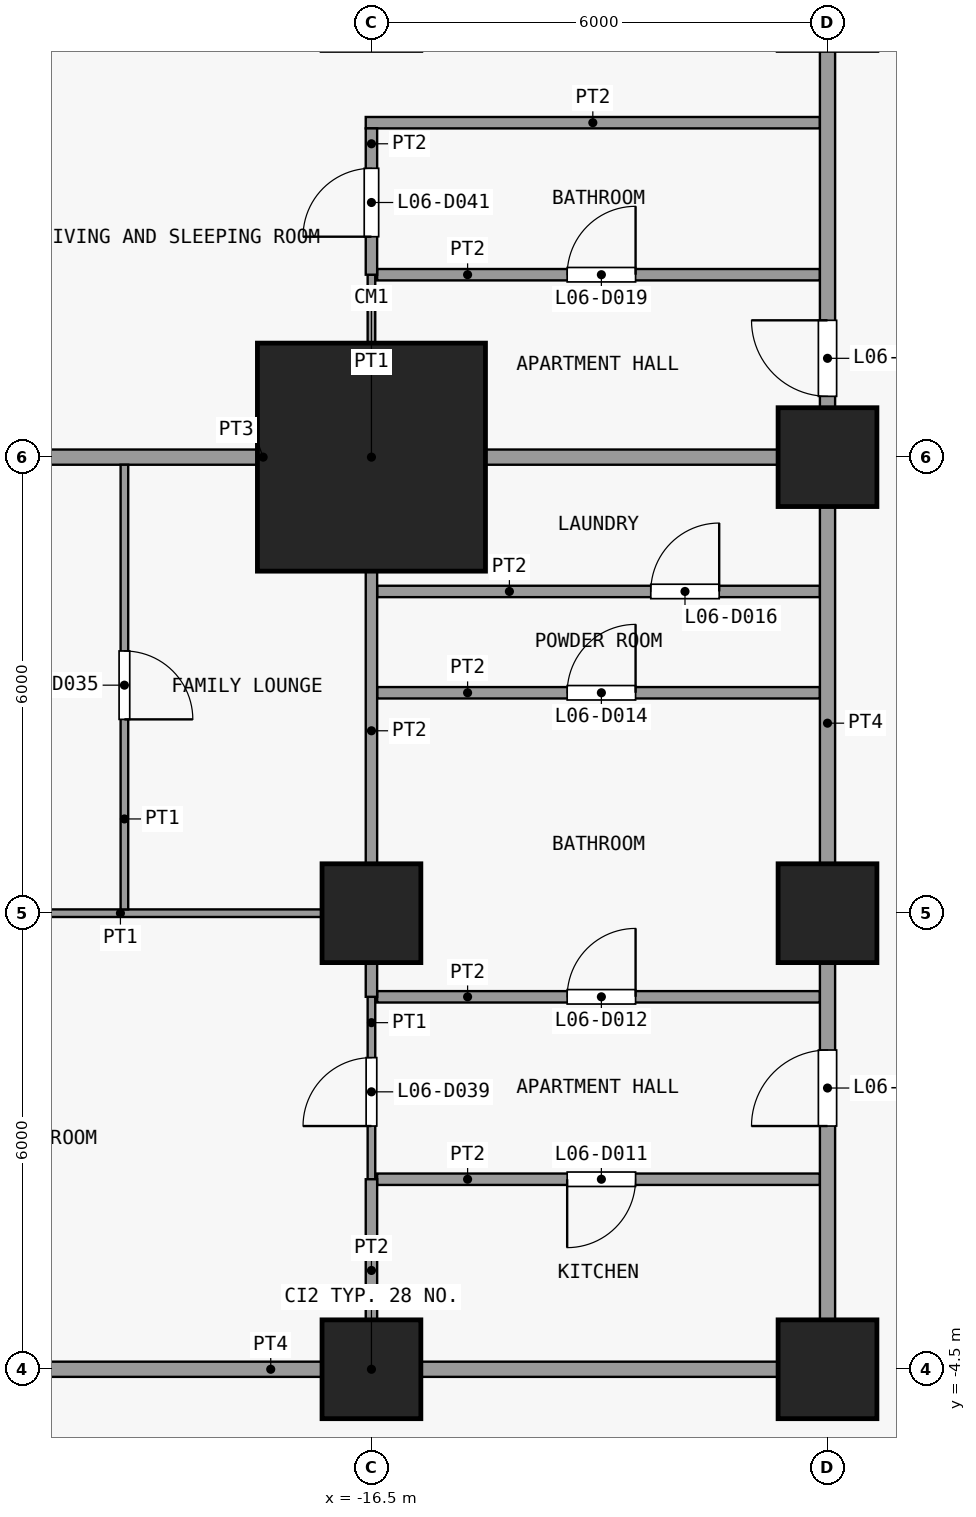
"""IFC4 building model, lengths in metres.
Left out: names, types, materials, properties, quantities, classifications, styles, units other than length and angle.
Written with IfcOpenShell. Run it as: python <this file> out.ifc"""

import sys

from ifc_helpers import new_model, si_unit, direction, frame, frame_2d, origin, origin_2d, place, context, subcontext, project, spatial, rectangle, extrude, element, fill, save


model = new_model("IFC4")
c1 = context("Model", 3, precision=1e-05, world=origin(), true_north=direction((0.0, 1.0)))
c2 = subcontext(c1, "Body", "Model", "MODEL_VIEW")
j1 = project(units=[si_unit("LENGTHUNIT", "METRE"), si_unit("PLANEANGLEUNIT", "RADIAN")], contexts=[c1])
p1 = place(None, origin())
s1 = spatial("IfcSite", under=j1, at=p1, CompositionType="ELEMENT")
p2 = place(p1, origin())
s2 = spatial("IfcBuilding", under=s1, at=p2, CompositionType="ELEMENT")
p3 = place(p2, frame((0.0, 0.0, 32.5)))
s3 = spatial("IfcBuildingStorey", under=s2, at=p3, CompositionType="ELEMENT", Elevation=32.5)
for number, where, z_axis, x_axis in (
    (1, (-16.5, -4.5, 0.0), (0.0, 0.0, 1.0), (1.0, 0.0, 0.0)),
    (2, (-16.5, 1.5, 0.0), (0.0, 0.0, 1.0), (1.0, 0.0, 0.0)),
):
    element("IfcColumn", number, at=place(p3, frame(where, z_axis=z_axis, x_axis=x_axis)), inside=s3, PredefinedType="COLUMN", context=c2, shape_type="SweptSolid", body=[
        extrude(rectangle(XDim=1.3, YDim=1.3, at=origin_2d()), origin(), (0.0, 0.0, 1.0), 3.6),
    ])
p4 = place(p3, frame((-16.5, 7.5, 0.0), z_axis=(0.0, 0.0, 1.0), x_axis=(1.0, 0.0, 0.0)))
e3 = element("IfcColumn", 3, at=p4, inside=s3, PredefinedType="COLUMN", context=c2, shape_type="SweptSolid", body=[
    extrude(rectangle(XDim=3.0, YDim=3.0, at=origin_2d()), origin(), (0.0, 0.0, 1.0), 3.6),
])
for number, where, z_axis, x_axis in (
    (4, (-10.5, -4.5, 0.0), (0.0, 0.0, 1.0), (1.0, 0.0, 0.0)),
    (5, (-10.5, 1.5, 0.0), (0.0, 0.0, 1.0), (1.0, 0.0, 0.0)),
    (6, (-10.5, 7.5, 0.0), (0.0, 0.0, 1.0), (1.0, 0.0, 0.0)),
):
    element("IfcColumn", number, at=place(p3, frame(where, z_axis=z_axis, x_axis=x_axis)), inside=s3, PredefinedType="COLUMN", context=c2, shape_type="SweptSolid", body=[
        extrude(rectangle(XDim=1.3, YDim=1.3, at=origin_2d()), origin(), (0.0, 0.0, 1.0), 3.6),
    ])
p5 = place(p3, frame((-25.25, -4.5, 0.0), z_axis=(0.0, 0.0, 1.0), x_axis=(1.0, 0.0, 0.0)))
e7 = element("IfcWall", 7, at=p5, inside=s3, PredefinedType="PARTITIONING", context=c2, shape_type="SweptSolid", body=[
    extrude(rectangle(XDim=14.85, YDim=0.2, at=frame_2d((7.425, 0.0))), origin(), (0.0, 0.0, 1.0), 3.3),
])
p6 = place(p3, frame((-16.425, -2.0, 0.0), z_axis=(0.0, 0.0, 1.0), x_axis=(1.0, 0.0, 0.0)))
e8 = element("IfcWall", 8, at=p6, inside=s3, PredefinedType="PARTITIONING", context=c2, shape_type="SweptSolid", body=[
    extrude(rectangle(XDim=5.825, YDim=0.15, at=frame_2d((2.913, 0.0))), origin(), (0.0, 0.0, 1.0), 3.3),
])
p7 = place(p6, frame((2.5, 0.0, 0.0)))
e9 = element("IfcOpeningElement", 9, at=p7, cuts=e8, PredefinedType="OPENING", context=c2, shape_type="SweptSolid", body=[
    extrude(rectangle(XDim=0.9, YDim=2.1, at=frame_2d((0.45, 1.05))), frame((0.0, 0.085, 0.0), z_axis=(0.0, -1.0, 0.0), x_axis=(1.0, 0.0, 0.0)), (0.0, 0.0, 1.0), 0.17),
])
p8 = place(p3, frame((-16.425, 0.4, 0.0), z_axis=(0.0, 0.0, 1.0), x_axis=(1.0, 0.0, 0.0)))
e10 = element("IfcWall", 10, at=p8, inside=s3, PredefinedType="PARTITIONING", context=c2, shape_type="SweptSolid", body=[
    extrude(rectangle(XDim=5.825, YDim=0.15, at=frame_2d((2.913, 0.0))), origin(), (0.0, 0.0, 1.0), 3.3),
])
p9 = place(p8, frame((2.5, 0.0, 0.0)))
e11 = element("IfcOpeningElement", 11, at=p9, cuts=e10, PredefinedType="OPENING", context=c2, shape_type="SweptSolid", body=[
    extrude(rectangle(XDim=0.9, YDim=2.1, at=frame_2d((0.45, 1.05))), frame((0.0, 0.085, 0.0), z_axis=(0.0, -1.0, 0.0), x_axis=(1.0, 0.0, 0.0)), (0.0, 0.0, 1.0), 0.17),
])
p10 = place(p3, frame((-25.25, 1.5, 0.0), z_axis=(0.0, 0.0, 1.0), x_axis=(1.0, 0.0, 0.0)))
e12 = element("IfcWall", 12, at=p10, inside=s3, PredefinedType="PARTITIONING", context=c2, shape_type="SweptSolid", body=[
    extrude(rectangle(XDim=8.675, YDim=0.1, at=frame_2d((4.337, 0.0))), origin(), (0.0, 0.0, 1.0), 3.3),
])
p11 = place(p10, frame((1.2, 0.0, 0.0)))
e13 = element("IfcOpeningElement", 13, at=p11, cuts=e12, PredefinedType="OPENING", context=c2, shape_type="SweptSolid", body=[
    extrude(rectangle(XDim=0.9, YDim=2.1, at=frame_2d((0.45, 1.05))), frame((0.0, 0.06, 0.0), z_axis=(0.0, -1.0, 0.0), x_axis=(1.0, 0.0, 0.0)), (0.0, 0.0, 1.0), 0.12),
])
p12 = place(p3, frame((-16.425, 4.4, 0.0), z_axis=(0.0, 0.0, 1.0), x_axis=(1.0, 0.0, 0.0)))
e14 = element("IfcWall", 14, at=p12, inside=s3, PredefinedType="PARTITIONING", context=c2, shape_type="SweptSolid", body=[
    extrude(rectangle(XDim=5.825, YDim=0.15, at=frame_2d((2.913, 0.0))), origin(), (0.0, 0.0, 1.0), 3.3),
])
p13 = place(p12, frame((2.5, 0.0, 0.0)))
e15 = element("IfcOpeningElement", 15, at=p13, cuts=e14, PredefinedType="OPENING", context=c2, shape_type="SweptSolid", body=[
    extrude(rectangle(XDim=0.9, YDim=2.1, at=frame_2d((0.45, 1.05))), frame((0.0, 0.085, 0.0), z_axis=(0.0, -1.0, 0.0), x_axis=(1.0, 0.0, 0.0)), (0.0, 0.0, 1.0), 0.17),
])
p14 = place(p3, frame((-16.425, 5.733, 0.0), z_axis=(0.0, 0.0, 1.0), x_axis=(1.0, 0.0, 0.0)))
e16 = element("IfcWall", 16, at=p14, inside=s3, PredefinedType="PARTITIONING", context=c2, shape_type="SweptSolid", body=[
    extrude(rectangle(XDim=5.825, YDim=0.15, at=frame_2d((2.913, 0.0))), origin(), (0.0, 0.0, 1.0), 3.3),
])
p15 = place(p14, frame((3.6, 0.0, 0.0)))
e17 = element("IfcOpeningElement", 17, at=p15, cuts=e16, PredefinedType="OPENING", context=c2, shape_type="SweptSolid", body=[
    extrude(rectangle(XDim=0.9, YDim=2.1, at=frame_2d((0.45, 1.05))), frame((0.0, 0.085, 0.0), z_axis=(0.0, -1.0, 0.0), x_axis=(1.0, 0.0, 0.0)), (0.0, 0.0, 1.0), 0.17),
])
p16 = place(p3, frame((-25.25, 7.5, 0.0), z_axis=(0.0, 0.0, 1.0), x_axis=(1.0, 0.0, 0.0)))
e18 = element("IfcWall", 18, at=p16, inside=s3, PredefinedType="PARTITIONING", context=c2, shape_type="SweptSolid", body=[
    extrude(rectangle(XDim=14.65, YDim=0.2, at=frame_2d((7.325, 0.0))), origin(), (0.0, 0.0, 1.0), 3.3),
])
p17 = place(p3, frame((-16.425, 9.9, 0.0), z_axis=(0.0, 0.0, 1.0), x_axis=(1.0, 0.0, 0.0)))
e19 = element("IfcWall", 19, at=p17, inside=s3, PredefinedType="PARTITIONING", context=c2, shape_type="SweptSolid", body=[
    extrude(rectangle(XDim=5.825, YDim=0.15, at=frame_2d((2.913, 0.0))), origin(), (0.0, 0.0, 1.0), 3.3),
])
p18 = place(p17, frame((2.5, 0.0, 0.0)))
e20 = element("IfcOpeningElement", 20, at=p18, cuts=e19, PredefinedType="OPENING", context=c2, shape_type="SweptSolid", body=[
    extrude(rectangle(XDim=0.9, YDim=2.1, at=frame_2d((0.45, 1.05))), frame((0.0, 0.085, 0.0), z_axis=(0.0, -1.0, 0.0), x_axis=(1.0, 0.0, 0.0)), (0.0, 0.0, 1.0), 0.17),
])
p19 = place(p3, frame((-16.575, 11.9, 0.0), z_axis=(0.0, 0.0, 1.0), x_axis=(1.0, 0.0, 0.0)))
e21 = element("IfcWall", 21, at=p19, inside=s3, PredefinedType="PARTITIONING", context=c2, shape_type="SweptSolid", body=[
    extrude(rectangle(XDim=5.975, YDim=0.15, at=frame_2d((2.987, 0.0))), origin(), (0.0, 0.0, 1.0), 3.3),
])
p20 = place(p3, frame((-19.75, 1.55, 0.0), z_axis=(0.0, 0.0, 1.0), x_axis=(0.0, 1.0, 0.0)))
e22 = element("IfcWall", 22, at=p20, inside=s3, PredefinedType="PARTITIONING", context=c2, shape_type="SweptSolid", body=[
    extrude(rectangle(XDim=5.85, YDim=0.1, at=frame_2d((2.925, 0.0))), origin(), (0.0, 0.0, 1.0), 3.3),
])
p21 = place(p20, frame((2.5, 0.0, 0.0)))
e23 = element("IfcOpeningElement", 23, at=p21, cuts=e22, PredefinedType="OPENING", context=c2, shape_type="SweptSolid", body=[
    extrude(rectangle(XDim=0.9, YDim=2.1, at=frame_2d((0.45, 1.05))), frame((0.0, 0.06, 0.0), z_axis=(0.0, -1.0, 0.0), x_axis=(1.0, 0.0, 0.0)), (0.0, 0.0, 1.0), 0.12),
])
p22 = place(p3, frame((-16.5, -2.0, 0.0), z_axis=(0.0, 0.0, 1.0), x_axis=(0.0, 1.0, 0.0)))
e24 = element("IfcWall", 24, at=p22, inside=s3, PredefinedType="PARTITIONING", context=c2, shape_type="SweptSolid", body=[
    extrude(rectangle(XDim=2.4, YDim=0.1, at=frame_2d((1.2, 0.0))), origin(), (0.0, 0.0, 1.0), 3.3),
])
p23 = place(p22, frame((0.7, 0.0, 0.0)))
e25 = element("IfcOpeningElement", 25, at=p23, cuts=e24, PredefinedType="OPENING", context=c2, shape_type="SweptSolid", body=[
    extrude(rectangle(XDim=0.9, YDim=2.1, at=frame_2d((0.45, 1.05))), frame((0.0, 0.06, 0.0), z_axis=(0.0, -1.0, 0.0), x_axis=(1.0, 0.0, 0.0)), (0.0, 0.0, 1.0), 0.12),
])
p24 = place(p3, frame((-16.5, 7.6, 0.0), z_axis=(0.0, 0.0, 1.0), x_axis=(0.0, 1.0, 0.0)))
e26 = element("IfcWall", 26, at=p24, inside=s3, PredefinedType="PARTITIONING", context=c2, shape_type="SweptSolid", body=[
    extrude(rectangle(XDim=2.3, YDim=0.1, at=frame_2d((1.15, 0.0))), origin(), (0.0, 0.0, 1.0), 3.3),
])
p25 = place(p3, frame((-16.5, -4.4, 0.0), z_axis=(0.0, 0.0, 1.0), x_axis=(0.0, 1.0, 0.0)))
e27 = element("IfcWall", 27, at=p25, inside=s3, PredefinedType="PARTITIONING", context=c2, shape_type="SweptSolid", body=[
    extrude(rectangle(XDim=2.4, YDim=0.15, at=frame_2d((1.2, 0.0))), origin(), (0.0, 0.0, 1.0), 3.3),
])
p26 = place(p3, frame((-16.5, 0.4, 0.0), z_axis=(0.0, 0.0, 1.0), x_axis=(0.0, 1.0, 0.0)))
e28 = element("IfcWall", 28, at=p26, inside=s3, PredefinedType="PARTITIONING", context=c2, shape_type="SweptSolid", body=[
    extrude(rectangle(XDim=7.0, YDim=0.15, at=frame_2d((3.5, 0.0))), origin(), (0.0, 0.0, 1.0), 3.3),
])
p27 = place(p3, frame((-16.5, 9.9, 0.0), z_axis=(0.0, 0.0, 1.0), x_axis=(0.0, 1.0, 0.0)))
e29 = element("IfcWall", 29, at=p27, inside=s3, PredefinedType="PARTITIONING", context=c2, shape_type="SweptSolid", body=[
    extrude(rectangle(XDim=1.925, YDim=0.15, at=frame_2d((0.962, 0.0))), origin(), (0.0, 0.0, 1.0), 3.3),
])
p28 = place(p27, frame((0.5, 0.0, 0.0)))
e30 = element("IfcOpeningElement", 30, at=p28, cuts=e29, PredefinedType="OPENING", context=c2, shape_type="SweptSolid", body=[
    extrude(rectangle(XDim=0.9, YDim=2.1, at=frame_2d((0.45, 1.05))), frame((0.0, 0.085, 0.0), z_axis=(0.0, -1.0, 0.0), x_axis=(1.0, 0.0, 0.0)), (0.0, 0.0, 1.0), 0.17),
])
p29 = place(p3, frame((-10.5, -4.4, 0.0), z_axis=(0.0, 0.0, 1.0), x_axis=(0.0, 1.0, 0.0)))
e31 = element("IfcWall", 31, at=p29, inside=s3, PredefinedType="PARTITIONING", context=c2, shape_type="SweptSolid", body=[
    extrude(rectangle(XDim=17.8, YDim=0.2, at=frame_2d((8.9, 0.0))), origin(), (0.0, 0.0, 1.0), 3.3),
])
p30 = place(p29, frame((3.1, 0.0, 0.0)))
e32 = element("IfcOpeningElement", 32, at=p30, cuts=e31, PredefinedType="OPENING", context=c2, shape_type="SweptSolid", body=[
    extrude(rectangle(XDim=1.0, YDim=2.1, at=frame_2d((0.5, 1.05))), frame((0.0, 0.11, 0.0), z_axis=(0.0, -1.0, 0.0), x_axis=(1.0, 0.0, 0.0)), (0.0, 0.0, 1.0), 0.22),
])
p31 = place(p29, frame((12.7, 0.0, 0.0)))
e33 = element("IfcOpeningElement", 33, at=p31, cuts=e31, PredefinedType="OPENING", context=c2, shape_type="SweptSolid", body=[
    extrude(rectangle(XDim=1.0, YDim=2.1, at=frame_2d((0.5, 1.05))), frame((0.0, 0.11, 0.0), z_axis=(0.0, -1.0, 0.0), x_axis=(1.0, 0.0, 0.0)), (0.0, 0.0, 1.0), 0.22),
])
p32 = place(p7, origin())
e34 = element("IfcDoor", 34, at=p32, inside=s3, OperationType="SINGLE_SWING_LEFT", PredefinedType="DOOR", context=c2, shape_type="SweptSolid", body=[
    extrude(rectangle(XDim=0.9, YDim=2.1, at=frame_2d((0.45, 1.05))), frame((0.0, 0.025, 0.0), z_axis=(0.0, -1.0, 0.0), x_axis=(1.0, 0.0, 0.0)), (0.0, 0.0, 1.0), 0.05),
])
fill(e9, e34)
p33 = place(p9, origin())
e35 = element("IfcDoor", 35, at=p33, inside=s3, OperationType="SINGLE_SWING_LEFT", PredefinedType="DOOR", context=c2, shape_type="SweptSolid", body=[
    extrude(rectangle(XDim=0.9, YDim=2.1, at=frame_2d((0.45, 1.05))), frame((0.0, 0.025, 0.0), z_axis=(0.0, -1.0, 0.0), x_axis=(1.0, 0.0, 0.0)), (0.0, 0.0, 1.0), 0.05),
])
fill(e11, e35)
p34 = place(p13, origin())
e36 = element("IfcDoor", 36, at=p34, inside=s3, OperationType="SINGLE_SWING_LEFT", PredefinedType="DOOR", context=c2, shape_type="SweptSolid", body=[
    extrude(rectangle(XDim=0.9, YDim=2.1, at=frame_2d((0.45, 1.05))), frame((0.0, 0.025, 0.0), z_axis=(0.0, -1.0, 0.0), x_axis=(1.0, 0.0, 0.0)), (0.0, 0.0, 1.0), 0.05),
])
fill(e15, e36)
p35 = place(p15, origin())
e37 = element("IfcDoor", 37, at=p35, inside=s3, OperationType="SINGLE_SWING_LEFT", PredefinedType="DOOR", context=c2, shape_type="SweptSolid", body=[
    extrude(rectangle(XDim=0.9, YDim=2.1, at=frame_2d((0.45, 1.05))), frame((0.0, 0.025, 0.0), z_axis=(0.0, -1.0, 0.0), x_axis=(1.0, 0.0, 0.0)), (0.0, 0.0, 1.0), 0.05),
])
fill(e17, e37)
p36 = place(p18, origin())
e38 = element("IfcDoor", 38, at=p36, inside=s3, OperationType="SINGLE_SWING_LEFT", PredefinedType="DOOR", context=c2, shape_type="SweptSolid", body=[
    extrude(rectangle(XDim=0.9, YDim=2.1, at=frame_2d((0.45, 1.05))), frame((0.0, 0.025, 0.0), z_axis=(0.0, -1.0, 0.0), x_axis=(1.0, 0.0, 0.0)), (0.0, 0.0, 1.0), 0.05),
])
fill(e20, e38)
p37 = place(p21, origin())
e39 = element("IfcDoor", 39, at=p37, inside=s3, OperationType="SINGLE_SWING_LEFT", PredefinedType="DOOR", context=c2, shape_type="SweptSolid", body=[
    extrude(rectangle(XDim=0.9, YDim=2.1, at=frame_2d((0.45, 1.05))), frame((0.0, 0.025, 0.0), z_axis=(0.0, -1.0, 0.0), x_axis=(1.0, 0.0, 0.0)), (0.0, 0.0, 1.0), 0.05),
])
fill(e23, e39)
p38 = place(p23, origin())
e40 = element("IfcDoor", 40, at=p38, inside=s3, OperationType="SINGLE_SWING_RIGHT", PredefinedType="DOOR", context=c2, shape_type="SweptSolid", body=[
    extrude(rectangle(XDim=0.9, YDim=2.1, at=frame_2d((0.45, 1.05))), frame((0.0, 0.025, 0.0), z_axis=(0.0, -1.0, 0.0), x_axis=(1.0, 0.0, 0.0)), (0.0, 0.0, 1.0), 0.05),
])
fill(e25, e40)
p39 = place(p28, origin())
e41 = element("IfcDoor", 41, at=p39, inside=s3, OperationType="SINGLE_SWING_RIGHT", PredefinedType="DOOR", context=c2, shape_type="SweptSolid", body=[
    extrude(rectangle(XDim=0.9, YDim=2.1, at=frame_2d((0.45, 1.05))), frame((0.0, 0.025, 0.0), z_axis=(0.0, -1.0, 0.0), x_axis=(1.0, 0.0, 0.0)), (0.0, 0.0, 1.0), 0.05),
])
fill(e30, e41)
p40 = place(p30, origin())
e42 = element("IfcDoor", 42, at=p40, inside=s3, OperationType="SINGLE_SWING_RIGHT", PredefinedType="DOOR", context=c2, shape_type="SweptSolid", body=[
    extrude(rectangle(XDim=1.0, YDim=2.1, at=frame_2d((0.5, 1.05))), frame((0.0, 0.025, 0.0), z_axis=(0.0, -1.0, 0.0), x_axis=(1.0, 0.0, 0.0)), (0.0, 0.0, 1.0), 0.05),
])
fill(e32, e42)
p41 = place(p31, origin())
e43 = element("IfcDoor", 43, at=p41, inside=s3, OperationType="SINGLE_SWING_LEFT", PredefinedType="DOOR", context=c2, shape_type="SweptSolid", body=[
    extrude(rectangle(XDim=1.0, YDim=2.1, at=frame_2d((0.5, 1.05))), frame((0.0, 0.025, 0.0), z_axis=(0.0, -1.0, 0.0), x_axis=(1.0, 0.0, 0.0)), (0.0, 0.0, 1.0), 0.05),
])
fill(e33, e43)
save(model, sys.argv[1])
